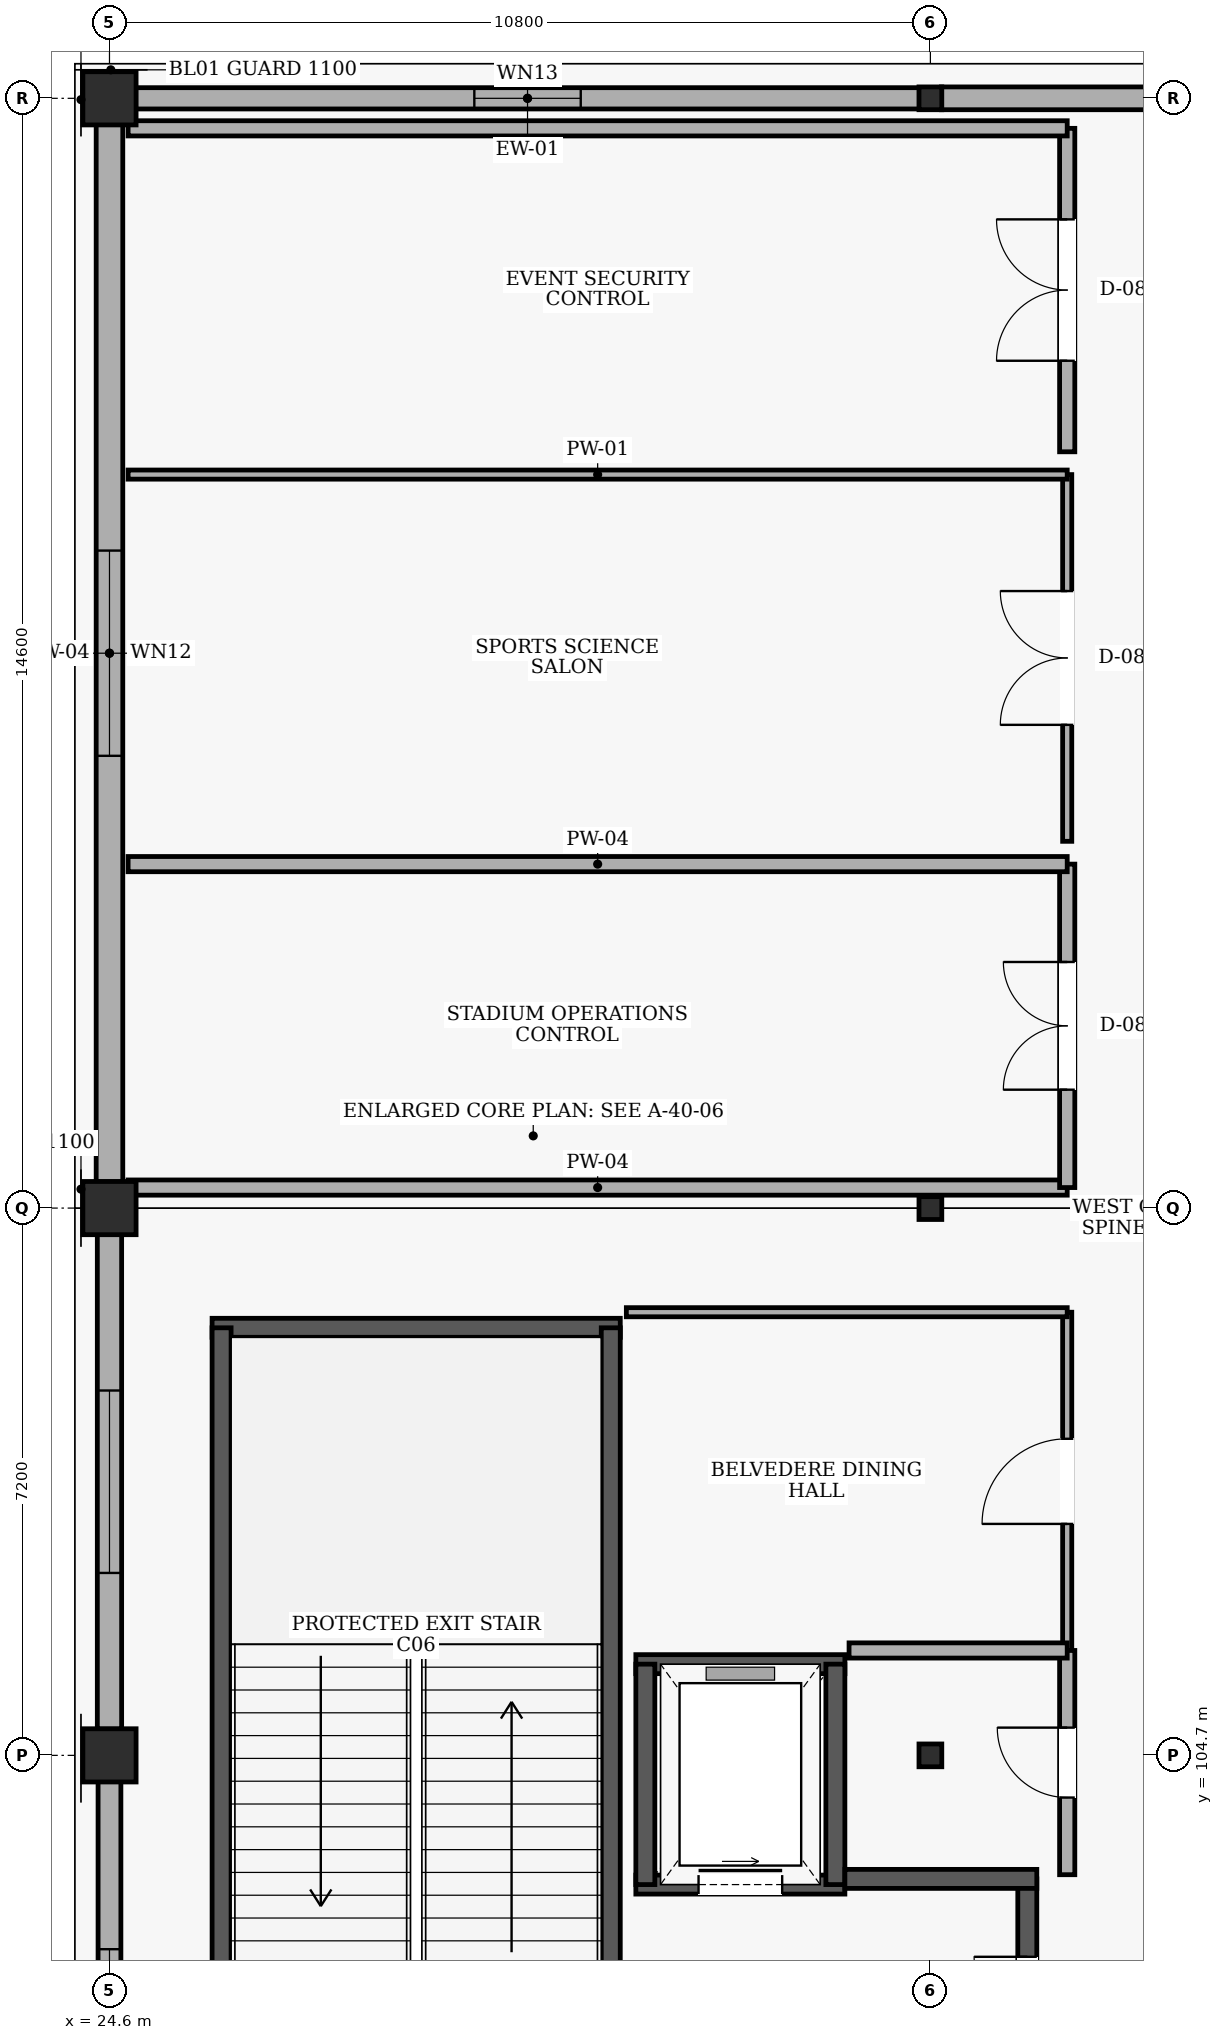
"""IFC4 building model, lengths in metres.
Left out: names, types, materials, properties, quantities, classifications, styles, units other than length and angle.
Written with IfcOpenShell. Run it as: python <this file> out.ifc"""

import sys

from ifc_helpers import new_model, si_unit, direction, frame, frame_2d, origin, origin_2d, place, context, subcontext, project, spatial, rectangle, hollow_rectangle, extrude, element, fill, save


model = new_model("IFC4")
c1 = context("Model", 3, precision=1e-05, world=origin(), true_north=direction((0.0, 1.0)))
c2 = subcontext(c1, "Body", "Model", "MODEL_VIEW")
j1 = project(units=[si_unit("LENGTHUNIT", "METRE"), si_unit("PLANEANGLEUNIT", "RADIAN")], contexts=[c1])
p1 = place(None, origin())
s1 = spatial("IfcSite", under=j1, at=p1, CompositionType="ELEMENT")
p2 = place(p1, origin())
s2 = spatial("IfcBuilding", under=s1, at=p2, CompositionType="ELEMENT")
p3 = place(p2, frame((0.0, 0.0, 24.6)))
s3 = spatial("IfcBuildingStorey", under=s2, at=p3, CompositionType="ELEMENT", Elevation=24.6)
for number, where, z_axis, x_axis in (
    (1, (24.6, 104.7, 0.0), (0.0, 0.0, 1.0), (1.0, 0.0, 0.0)),
    (2, (24.6, 111.9, 0.0), (0.0, 0.0, 1.0), (1.0, 0.0, 0.0)),
    (3, (24.6, 126.5, 0.0), (0.0, 0.0, 1.0), (1.0, 0.0, 0.0)),
):
    element("IfcColumn", number, at=place(p3, frame(where, z_axis=z_axis, x_axis=x_axis)), inside=s3, PredefinedType="COLUMN", context=c2, shape_type="SweptSolid", body=[
        extrude(rectangle(XDim=0.7, YDim=0.7, at=origin_2d()), origin(), (0.0, 0.0, 1.0), 4.8),
    ])
for number, where, z_axis, x_axis in (
    (4, (35.4, 104.7, 0.0), (0.0, 0.0, 1.0), (1.0, 0.0, 0.0)),
    (5, (35.4, 111.9, 0.0), (0.0, 0.0, 1.0), (1.0, 0.0, 0.0)),
    (6, (35.4, 126.5, 0.0), (0.0, 0.0, 1.0), (1.0, 0.0, 0.0)),
):
    element("IfcColumn", number, at=place(p3, frame(where, z_axis=z_axis, x_axis=x_axis)), inside=s3, PredefinedType="COLUMN", context=c2, shape_type="SweptSolid", body=[
        extrude(hollow_rectangle(XDim=0.3, YDim=0.3, WallThickness=0.016, at=origin_2d()), origin(), (0.0, 0.0, 1.0), 4.8),
    ])
p4 = place(p3, frame((24.6, 97.845, 0.0), z_axis=(0.0, 0.0, 1.0), x_axis=(0.0, 1.0, 0.0)))
e7 = element("IfcWall", 7, at=p4, inside=s3, PredefinedType="SOLIDWALL", context=c2, shape_type="SweptSolid", body=[
    extrude(rectangle(XDim=6.51, YDim=0.3, at=frame_2d((3.255, 0.0))), origin(), (0.0, 0.0, 1.0), 3.88),
])
p5 = place(p4, frame((2.205, 0.0, 0.9)))
e8 = element("IfcOpeningElement", 8, at=p5, cuts=e7, PredefinedType="OPENING", context=c2, shape_type="SweptSolid", body=[
    extrude(rectangle(XDim=2.1, YDim=1.8, at=frame_2d((1.05, 0.9))), frame((0.0, 0.16, 0.0), z_axis=(0.0, -1.0, 0.0), x_axis=(1.0, 0.0, 0.0)), (0.0, 0.0, 1.0), 0.32),
])
p6 = place(p3, frame((24.6, 105.045, 0.0), z_axis=(0.0, 0.0, 1.0), x_axis=(0.0, 1.0, 0.0)))
e9 = element("IfcWall", 9, at=p6, inside=s3, PredefinedType="SOLIDWALL", context=c2, shape_type="SweptSolid", body=[
    extrude(rectangle(XDim=6.51, YDim=0.32, at=frame_2d((3.255, 0.0))), origin(), (0.0, 0.0, 1.0), 3.88),
])
p7 = place(p6, frame((2.055, 0.0, 0.9)))
e10 = element("IfcOpeningElement", 10, at=p7, cuts=e9, PredefinedType="OPENING", context=c2, shape_type="SweptSolid", body=[
    extrude(rectangle(XDim=2.4, YDim=1.8, at=frame_2d((1.2, 0.9))), frame((0.0, 0.17, 0.0), z_axis=(0.0, -1.0, 0.0), x_axis=(1.0, 0.0, 0.0)), (0.0, 0.0, 1.0), 0.34),
])
p8 = place(p3, frame((24.6, 112.245, 0.0), z_axis=(0.0, 0.0, 1.0), x_axis=(0.0, 1.0, 0.0)))
e11 = element("IfcWall", 11, at=p8, inside=s3, PredefinedType="SOLIDWALL", context=c2, shape_type="SweptSolid", body=[
    extrude(rectangle(XDim=13.91, YDim=0.35, at=frame_2d((6.955, 0.0))), origin(), (0.0, 0.0, 1.0), 3.52),
])
p9 = place(p8, frame((5.605, 0.0, 0.9)))
e12 = element("IfcOpeningElement", 12, at=p9, cuts=e11, PredefinedType="OPENING", context=c2, shape_type="SweptSolid", body=[
    extrude(rectangle(XDim=2.7, YDim=1.8, at=frame_2d((1.35, 0.9))), frame((0.0, 0.185, 0.0), z_axis=(0.0, -1.0, 0.0), x_axis=(1.0, 0.0, 0.0)), (0.0, 0.0, 1.0), 0.37),
])
p10 = place(p3, frame((24.945, 126.5, 0.0), z_axis=(0.0, 0.0, 1.0), x_axis=(1.0, 0.0, 0.0)))
e13 = element("IfcWall", 13, at=p10, inside=s3, PredefinedType="SOLIDWALL", context=c2, shape_type="SweptSolid", body=[
    extrude(rectangle(XDim=10.31, YDim=0.28, at=frame_2d((5.155, 0.0))), origin(), (0.0, 0.0, 1.0), 3.72),
])
p11 = place(p10, frame((4.455, 0.0, 0.9)))
e14 = element("IfcOpeningElement", 14, at=p11, cuts=e13, PredefinedType="OPENING", context=c2, shape_type="SweptSolid", body=[
    extrude(rectangle(XDim=1.4, YDim=2.1, at=frame_2d((0.7, 1.05))), frame((0.0, 0.15, 0.0), z_axis=(0.0, -1.0, 0.0), x_axis=(1.0, 0.0, 0.0)), (0.0, 0.0, 1.0), 0.3),
])
p12 = place(p3, frame((35.545, 126.5, 0.0), z_axis=(0.0, 0.0, 1.0), x_axis=(1.0, 0.0, 0.0)))
e15 = element("IfcWall", 15, at=p12, inside=s3, PredefinedType="SOLIDWALL", context=c2, shape_type="SweptSolid", body=[
    extrude(rectangle(XDim=10.463, YDim=0.3, at=frame_2d((5.231, 0.0))), origin(), (0.0, 0.0, 1.0), 3.72),
])
p13 = place(p12, frame((4.331, 0.0, 0.9)))
e16 = element("IfcOpeningElement", 16, at=p13, cuts=e15, PredefinedType="OPENING", context=c2, shape_type="SweptSolid", body=[
    extrude(rectangle(XDim=1.8, YDim=2.1, at=frame_2d((0.9, 1.05))), frame((0.0, 0.16, 0.0), z_axis=(0.0, -1.0, 0.0), x_axis=(1.0, 0.0, 0.0)), (0.0, 0.0, 1.0), 0.32),
])
p14 = place(p3, frame((31.32, 110.325, 0.0), z_axis=(0.0, 0.0, 1.0), x_axis=(-1.0, 0.0, 0.0)))
e17 = element("IfcWall", 17, at=p14, inside=s3, PredefinedType="SHEAR", context=c2, shape_type="SweptSolid", body=[
    extrude(rectangle(XDim=5.37, YDim=0.25, at=frame_2d((2.685, 0.0))), origin(), (0.0, 0.0, 1.0), 4.5),
])
p15 = place(p3, frame((26.075, 99.475, 0.0), z_axis=(0.0, 0.0, 1.0), x_axis=(0.0, 1.0, 0.0)))
e18 = element("IfcWall", 18, at=p15, inside=s3, PredefinedType="SHEAR", context=c2, shape_type="SweptSolid", body=[
    extrude(rectangle(XDim=10.85, YDim=0.25, at=frame_2d((5.425, 0.0))), origin(), (0.0, 0.0, 1.0), 4.5),
])
p16 = place(p3, frame((31.195, 99.475, 0.0), z_axis=(0.0, 0.0, 1.0), x_axis=(0.0, 1.0, 0.0)))
e19 = element("IfcWall", 19, at=p16, inside=s3, PredefinedType="SHEAR", context=c2, shape_type="SweptSolid", body=[
    extrude(rectangle(XDim=10.85, YDim=0.25, at=frame_2d((5.425, 0.0))), origin(), (0.0, 0.0, 1.0), 4.5),
])
p17 = place(p16, frame((0.52, 0.0, 0.0)))
e20 = element("IfcOpeningElement", 20, at=p17, cuts=e19, PredefinedType="OPENING", context=c2, shape_type="SweptSolid", body=[
    extrude(rectangle(XDim=1.4, YDim=2.15, at=frame_2d((0.7, 1.075))), frame((0.0, 0.135, 0.0), z_axis=(0.0, -1.0, 0.0), x_axis=(1.0, 0.0, 0.0)), (0.0, 0.0, 1.0), 0.27),
])
p18 = place(p3, frame((31.525, 103.0, 0.0), z_axis=(0.0, 0.0, 1.0), x_axis=(1.0, 0.0, 0.0)))
e21 = element("IfcWall", 21, at=p18, inside=s3, PredefinedType="SHEAR", context=c2, shape_type="SweptSolid", body=[
    extrude(rectangle(XDim=2.75, YDim=0.25, at=frame_2d((1.375, 0.0))), origin(), (0.0, 0.0, 1.0), 4.5),
])
p19 = place(p18, frame((0.825, 0.0, 0.0)))
e22 = element("IfcOpeningElement", 22, at=p19, cuts=e21, PredefinedType="OPENING", context=c2, shape_type="SweptSolid", body=[
    extrude(rectangle(XDim=1.1, YDim=2.15, at=frame_2d((0.55, 1.075))), frame((0.0, 0.135, 0.0), z_axis=(0.0, -1.0, 0.0), x_axis=(1.0, 0.0, 0.0)), (0.0, 0.0, 1.0), 0.27),
])
p20 = place(p3, frame((34.275, 105.9, 0.0), z_axis=(0.0, 0.0, 1.0), x_axis=(-1.0, 0.0, 0.0)))
e23 = element("IfcWall", 23, at=p20, inside=s3, PredefinedType="SHEAR", context=c2, shape_type="SweptSolid", body=[
    extrude(rectangle(XDim=2.75, YDim=0.25, at=frame_2d((1.375, 0.0))), origin(), (0.0, 0.0, 1.0), 4.5),
])
for number, where, z_axis, x_axis in (
    (24, (31.65, 105.9, 0.0), (0.0, 0.0, 1.0), (0.0, -1.0, 0.0)),
    (25, (34.15, 103.0, 0.0), (0.0, 0.0, 1.0), (0.0, 1.0, 0.0)),
):
    element("IfcWall", number, at=place(p3, frame(where, z_axis=z_axis, x_axis=x_axis)), inside=s3, PredefinedType="SHEAR", context=c2, shape_type="SweptSolid", body=[
        extrude(rectangle(XDim=2.9, YDim=0.25, at=frame_2d((1.45, 0.0))), origin(), (0.0, 0.0, 1.0), 4.5),
    ])
p21 = place(p3, frame((36.675, 99.625, 0.0), z_axis=(0.0, 0.0, 1.0), x_axis=(0.0, 1.0, 0.0)))
e26 = element("IfcWall", 26, at=p21, inside=s3, PredefinedType="SHEAR", context=c2, shape_type="SweptSolid", body=[
    extrude(rectangle(XDim=3.45, YDim=0.25, at=frame_2d((1.725, 0.0))), origin(), (0.0, 0.0, 1.0), 4.5),
])
p22 = place(p21, frame((1.025, 0.0, 0.0)))
e27 = element("IfcOpeningElement", 27, at=p22, cuts=e26, PredefinedType="OPENING", context=c2, shape_type="SweptSolid", body=[
    extrude(rectangle(XDim=1.4, YDim=2.15, at=frame_2d((0.7, 1.075))), frame((0.0, 0.135, 0.0), z_axis=(0.0, -1.0, 0.0), x_axis=(1.0, 0.0, 0.0)), (0.0, 0.0, 1.0), 0.27),
])
p23 = place(p3, frame((34.275, 103.075, 0.0), z_axis=(0.0, 0.0, 1.0), x_axis=(1.0, 0.0, 0.0)))
e28 = element("IfcWall", 28, at=p23, inside=s3, PredefinedType="SHEAR", context=c2, shape_type="SweptSolid", body=[
    extrude(rectangle(XDim=2.525, YDim=0.25, at=frame_2d((1.263, 0.0))), origin(), (0.0, 0.0, 1.0), 4.5),
])
p24 = place(p3, frame((37.2, 106.08, 0.0), z_axis=(0.0, 0.0, 1.0), x_axis=(0.0, 1.0, 0.0)))
e29 = element("IfcWall", 29, at=p24, inside=s3, PredefinedType="PARTITIONING", context=c2, shape_type="SweptSolid", body=[
    extrude(rectangle(XDim=4.45, YDim=0.12, at=frame_2d((2.225, 0.0))), origin(), (0.0, 0.0, 1.0), 4.5),
])
p25 = place(p24, frame((1.665, 0.0, 0.0)))
e30 = element("IfcOpeningElement", 30, at=p25, cuts=e29, PredefinedType="OPENING", context=c2, shape_type="SweptSolid", body=[
    extrude(rectangle(XDim=1.12, YDim=2.15, at=frame_2d((0.56, 1.075))), frame((0.0, 0.07, 0.0), z_axis=(0.0, -1.0, 0.0), x_axis=(1.0, 0.0, 0.0)), (0.0, 0.0, 1.0), 0.14),
])
p26 = place(p3, frame((37.2, 110.53, 0.0), z_axis=(0.0, 0.0, 1.0), x_axis=(-1.0, 0.0, 0.0)))
e31 = element("IfcWall", 31, at=p26, inside=s3, PredefinedType="PARTITIONING", context=c2, shape_type="SweptSolid", body=[
    extrude(rectangle(XDim=5.8, YDim=0.12, at=frame_2d((2.9, 0.0))), origin(), (0.0, 0.0, 1.0), 4.5),
])
p27 = place(p3, frame((37.2, 103.13, 0.0), z_axis=(0.0, 0.0, 1.0), x_axis=(0.0, 1.0, 0.0)))
e32 = element("IfcWall", 32, at=p27, inside=s3, PredefinedType="PARTITIONING", context=c2, shape_type="SweptSolid", body=[
    extrude(rectangle(XDim=2.95, YDim=0.2, at=frame_2d((1.475, 0.0))), origin(), (0.0, 0.0, 1.0), 4.5),
])
p28 = place(p27, frame((1.015, 0.0, 0.0)))
e33 = element("IfcOpeningElement", 33, at=p28, cuts=e32, PredefinedType="OPENING", context=c2, shape_type="SweptSolid", body=[
    extrude(rectangle(XDim=0.92, YDim=2.1, at=frame_2d((0.46, 1.05))), frame((0.0, 0.11, 0.0), z_axis=(0.0, -1.0, 0.0), x_axis=(1.0, 0.0, 0.0)), (0.0, 0.0, 1.0), 0.22),
])
p29 = place(p3, frame((37.2, 106.08, 0.0), z_axis=(0.0, 0.0, 1.0), x_axis=(-1.0, 0.0, 0.0)))
e34 = element("IfcWall", 34, at=p29, inside=s3, PredefinedType="PARTITIONING", context=c2, shape_type="SweptSolid", body=[
    extrude(rectangle(XDim=2.87, YDim=0.2, at=frame_2d((1.435, 0.0))), origin(), (0.0, 0.0, 1.0), 4.5),
])
p30 = place(p3, frame((24.845, 112.17, 0.0), z_axis=(0.0, 0.0, 1.0), x_axis=(1.0, 0.0, 0.0)))
e35 = element("IfcWall", 35, at=p30, inside=s3, PredefinedType="PARTITIONING", context=c2, shape_type="SweptSolid", body=[
    extrude(rectangle(XDim=12.355, YDim=0.2, at=frame_2d((6.177, 0.0))), origin(), (0.0, 0.0, 1.0), 4.5),
])
p31 = place(p3, frame((37.2, 112.17, 0.0), z_axis=(0.0, 0.0, 1.0), x_axis=(0.0, 1.0, 0.0)))
e36 = element("IfcWall", 36, at=p31, inside=s3, PredefinedType="PARTITIONING", context=c2, shape_type="SweptSolid", body=[
    extrude(rectangle(XDim=4.255, YDim=0.2, at=frame_2d((2.128, 0.0))), origin(), (0.0, 0.0, 1.0), 4.5),
])
p32 = place(p31, frame((1.288, 0.0, 0.0)))
e37 = element("IfcOpeningElement", 37, at=p32, cuts=e36, PredefinedType="OPENING", context=c2, shape_type="SweptSolid", body=[
    extrude(rectangle(XDim=1.68, YDim=2.25, at=frame_2d((0.84, 1.125))), frame((0.0, 0.11, 0.0), z_axis=(0.0, -1.0, 0.0), x_axis=(1.0, 0.0, 0.0)), (0.0, 0.0, 1.0), 0.22),
])
p33 = place(p3, frame((37.2, 116.425, 0.0), z_axis=(0.0, 0.0, 1.0), x_axis=(-1.0, 0.0, 0.0)))
e38 = element("IfcWall", 38, at=p33, inside=s3, PredefinedType="PARTITIONING", context=c2, shape_type="SweptSolid", body=[
    extrude(rectangle(XDim=12.355, YDim=0.2, at=frame_2d((6.177, 0.0))), origin(), (0.0, 0.0, 1.0), 4.5),
])
p34 = place(p3, frame((37.2, 116.725, 0.0), z_axis=(0.0, 0.0, 1.0), x_axis=(0.0, 1.0, 0.0)))
e39 = element("IfcWall", 39, at=p34, inside=s3, PredefinedType="PARTITIONING", context=c2, shape_type="SweptSolid", body=[
    extrude(rectangle(XDim=4.825, YDim=0.12, at=frame_2d((2.412, 0.0))), origin(), (0.0, 0.0, 1.0), 4.5),
])
p35 = place(p34, frame((1.532, 0.0, 0.0)))
e40 = element("IfcOpeningElement", 40, at=p35, cuts=e39, PredefinedType="OPENING", context=c2, shape_type="SweptSolid", body=[
    extrude(rectangle(XDim=1.76, YDim=2.25, at=frame_2d((0.88, 1.125))), frame((0.0, 0.07, 0.0), z_axis=(0.0, -1.0, 0.0), x_axis=(1.0, 0.0, 0.0)), (0.0, 0.0, 1.0), 0.14),
])
p36 = place(p3, frame((37.2, 121.55, 0.0), z_axis=(0.0, 0.0, 1.0), x_axis=(-1.0, 0.0, 0.0)))
e41 = element("IfcWall", 41, at=p36, inside=s3, PredefinedType="PARTITIONING", context=c2, shape_type="SweptSolid", body=[
    extrude(rectangle(XDim=12.355, YDim=0.12, at=frame_2d((6.177, 0.0))), origin(), (0.0, 0.0, 1.0), 4.5),
])
p37 = place(p3, frame((37.2, 121.85, 0.0), z_axis=(0.0, 0.0, 1.0), x_axis=(0.0, 1.0, 0.0)))
e42 = element("IfcWall", 42, at=p37, inside=s3, PredefinedType="PARTITIONING", context=c2, shape_type="SweptSolid", body=[
    extrude(rectangle(XDim=4.255, YDim=0.2, at=frame_2d((2.127, 0.0))), origin(), (0.0, 0.0, 1.0), 4.5),
])
p38 = place(p37, frame((1.198, 0.0, 0.0)))
e43 = element("IfcOpeningElement", 43, at=p38, cuts=e42, PredefinedType="OPENING", context=c2, shape_type="SweptSolid", body=[
    extrude(rectangle(XDim=1.86, YDim=2.3, at=frame_2d((0.93, 1.15))), frame((0.0, 0.11, 0.0), z_axis=(0.0, -1.0, 0.0), x_axis=(1.0, 0.0, 0.0)), (0.0, 0.0, 1.0), 0.22),
])
p39 = place(p3, frame((37.2, 126.105, 0.0), z_axis=(0.0, 0.0, 1.0), x_axis=(-1.0, 0.0, 0.0)))
e44 = element("IfcWall", 44, at=p39, inside=s3, PredefinedType="PARTITIONING", context=c2, shape_type="SweptSolid", body=[
    extrude(rectangle(XDim=12.355, YDim=0.2, at=frame_2d((6.177, 0.0))), origin(), (0.0, 0.0, 1.0), 3.72),
])
p40 = place(p5, origin())
e45 = element("IfcWindow", 45, at=p40, inside=s3, PartitioningType="SINGLE_PANEL", PredefinedType="WINDOW", context=c2, shape_type="SweptSolid", body=[
    extrude(rectangle(XDim=2.1, YDim=1.8, at=frame_2d((1.05, 0.9))), frame((0.0, 0.03, 0.0), z_axis=(0.0, -1.0, 0.0), x_axis=(1.0, 0.0, 0.0)), (0.0, 0.0, 1.0), 0.06),
])
fill(e8, e45)
p41 = place(p7, origin())
e46 = element("IfcWindow", 46, at=p41, inside=s3, PartitioningType="SINGLE_PANEL", PredefinedType="WINDOW", context=c2, shape_type="SweptSolid", body=[
    extrude(rectangle(XDim=2.4, YDim=1.8, at=frame_2d((1.2, 0.9))), frame((0.0, 0.03, 0.0), z_axis=(0.0, -1.0, 0.0), x_axis=(1.0, 0.0, 0.0)), (0.0, 0.0, 1.0), 0.06),
])
fill(e10, e46)
p42 = place(p9, origin())
e47 = element("IfcWindow", 47, at=p42, inside=s3, PartitioningType="SINGLE_PANEL", PredefinedType="WINDOW", context=c2, shape_type="SweptSolid", body=[
    extrude(rectangle(XDim=2.7, YDim=1.8, at=frame_2d((1.35, 0.9))), frame((0.0, 0.03, 0.0), z_axis=(0.0, -1.0, 0.0), x_axis=(1.0, 0.0, 0.0)), (0.0, 0.0, 1.0), 0.06),
])
fill(e12, e47)
p43 = place(p11, origin())
e48 = element("IfcWindow", 48, at=p43, inside=s3, PartitioningType="SINGLE_PANEL", PredefinedType="WINDOW", context=c2, shape_type="SweptSolid", body=[
    extrude(rectangle(XDim=1.4, YDim=2.1, at=frame_2d((0.7, 1.05))), frame((0.0, 0.03, 0.0), z_axis=(0.0, -1.0, 0.0), x_axis=(1.0, 0.0, 0.0)), (0.0, 0.0, 1.0), 0.06),
])
fill(e14, e48)
p44 = place(p19, origin())
e49 = element("IfcDoor", 49, at=p44, inside=s3, OperationType="SLIDING_TO_LEFT", PredefinedType="DOOR", context=c2, shape_type="SweptSolid", body=[
    extrude(rectangle(XDim=1.1, YDim=2.15, at=frame_2d((0.55, 1.075))), frame((0.0, 0.025, 0.0), z_axis=(0.0, -1.0, 0.0), x_axis=(1.0, 0.0, 0.0)), (0.0, 0.0, 1.0), 0.05),
])
fill(e22, e49)
p45 = place(p22, origin())
e50 = element("IfcDoor", 50, at=p45, inside=s3, OperationType="DOUBLE_DOOR_SINGLE_SWING", PredefinedType="DOOR", context=c2, shape_type="SweptSolid", body=[
    extrude(rectangle(XDim=1.4, YDim=2.15, at=frame_2d((0.7, 1.075))), frame((0.0, 0.025, 0.0), z_axis=(0.0, -1.0, 0.0), x_axis=(1.0, 0.0, 0.0)), (0.0, 0.0, 1.0), 0.05),
])
fill(e27, e50)
p46 = place(p25, origin())
e51 = element("IfcDoor", 51, at=p46, inside=s3, OperationType="SINGLE_SWING_LEFT", PredefinedType="DOOR", context=c2, shape_type="SweptSolid", body=[
    extrude(rectangle(XDim=1.12, YDim=2.15, at=frame_2d((0.56, 1.075))), frame((0.0, 0.025, 0.0), z_axis=(0.0, -1.0, 0.0), x_axis=(1.0, 0.0, 0.0)), (0.0, 0.0, 1.0), 0.05),
])
fill(e30, e51)
p47 = place(p28, origin())
e52 = element("IfcDoor", 52, at=p47, inside=s3, OperationType="SINGLE_SWING_RIGHT", PredefinedType="DOOR", context=c2, shape_type="SweptSolid", body=[
    extrude(rectangle(XDim=0.92, YDim=2.1, at=frame_2d((0.46, 1.05))), frame((0.0, 0.025, 0.0), z_axis=(0.0, -1.0, 0.0), x_axis=(1.0, 0.0, 0.0)), (0.0, 0.0, 1.0), 0.05),
])
fill(e33, e52)
p48 = place(p32, origin())
e53 = element("IfcDoor", 53, at=p48, inside=s3, OperationType="DOUBLE_DOOR_SINGLE_SWING", PredefinedType="DOOR", context=c2, shape_type="SweptSolid", body=[
    extrude(rectangle(XDim=1.68, YDim=2.25, at=frame_2d((0.84, 1.125))), frame((0.0, 0.025, 0.0), z_axis=(0.0, -1.0, 0.0), x_axis=(1.0, 0.0, 0.0)), (0.0, 0.0, 1.0), 0.05),
])
fill(e37, e53)
p49 = place(p35, origin())
e54 = element("IfcDoor", 54, at=p49, inside=s3, OperationType="DOUBLE_DOOR_SINGLE_SWING", PredefinedType="DOOR", context=c2, shape_type="SweptSolid", body=[
    extrude(rectangle(XDim=1.76, YDim=2.25, at=frame_2d((0.88, 1.125))), frame((0.0, 0.025, 0.0), z_axis=(0.0, -1.0, 0.0), x_axis=(1.0, 0.0, 0.0)), (0.0, 0.0, 1.0), 0.05),
])
fill(e40, e54)
p50 = place(p38, origin())
e55 = element("IfcDoor", 55, at=p50, inside=s3, OperationType="DOUBLE_DOOR_SINGLE_SWING", PredefinedType="DOOR", context=c2, shape_type="SweptSolid", body=[
    extrude(rectangle(XDim=1.86, YDim=2.3, at=frame_2d((0.93, 1.15))), frame((0.0, 0.025, 0.0), z_axis=(0.0, -1.0, 0.0), x_axis=(1.0, 0.0, 0.0)), (0.0, 0.0, 1.0), 0.05),
])
fill(e43, e55)
save(model, sys.argv[1])
